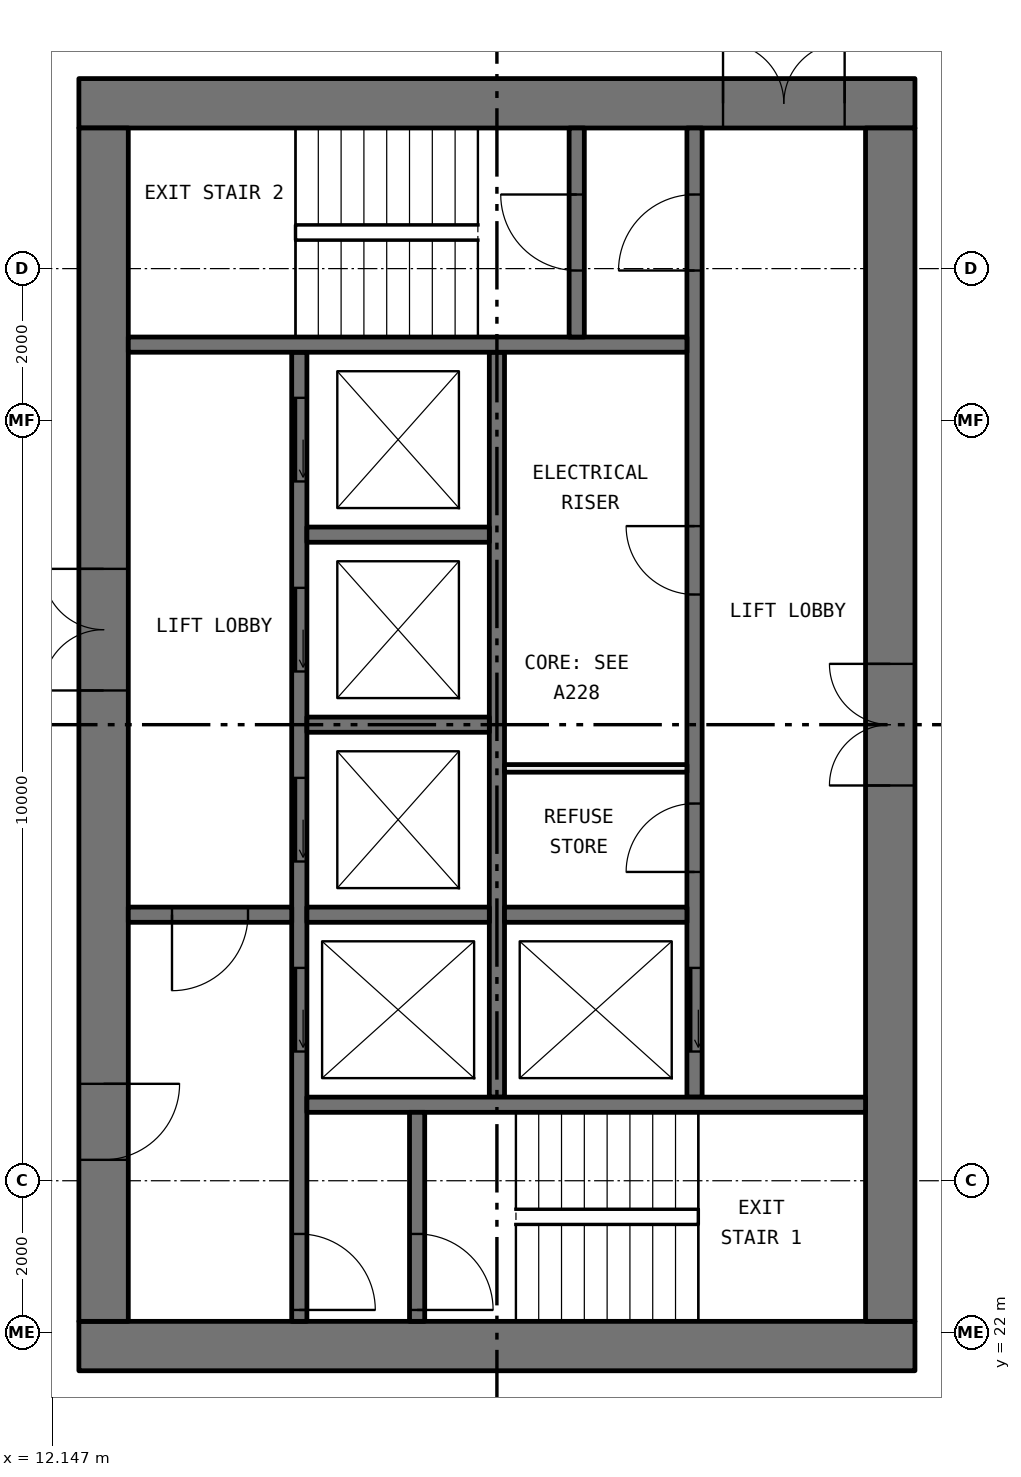
"""IFC4 building model, lengths in metres.
Left out: names, types, materials, properties, quantities, classifications, styles, units other than length and angle.
Written with IfcOpenShell. Run it as: python <this file> out.ifc"""

import sys

from ifc_helpers import new_model, si_unit, direction, frame, frame_2d, origin, place, context, subcontext, project, spatial, rectangle, extrude, element, fill, save


model = new_model("IFC4")
c1 = context("Model", 3, precision=1e-05, world=origin(), true_north=direction((0.0, 1.0)))
c2 = subcontext(c1, "Body", "Model", "MODEL_VIEW")
j1 = project(units=[si_unit("LENGTHUNIT", "METRE"), si_unit("PLANEANGLEUNIT", "RADIAN")], contexts=[c1])
p1 = place(None, origin())
s1 = spatial("IfcSite", under=j1, at=p1, CompositionType="ELEMENT")
p2 = place(p1, origin())
s2 = spatial("IfcBuilding", under=s1, at=p2, CompositionType="ELEMENT")
p3 = place(p2, frame((0.0, 0.0, 106.95)))
s3 = spatial("IfcBuildingStorey", under=s2, at=p3, CompositionType="ELEMENT", Elevation=106.95)
p4 = place(p3, frame((12.5, 21.825, 0.0), z_axis=(0.0, 0.0, 1.0), x_axis=(1.0, 0.0, 0.0)))
e1 = element("IfcWall", 1, at=p4, inside=s3, PredefinedType="SHEAR", context=c2, shape_type="SweptSolid", body=[
    extrude(rectangle(XDim=11.0, YDim=0.65, at=frame_2d((5.5, 0.0))), origin(), (0.0, 0.0, 1.0), 3.05),
])
p5 = place(p3, frame((12.5, 38.175, 0.0), z_axis=(0.0, 0.0, 1.0), x_axis=(1.0, 0.0, 0.0)))
e2 = element("IfcWall", 2, at=p5, inside=s3, PredefinedType="SHEAR", context=c2, shape_type="SweptSolid", body=[
    extrude(rectangle(XDim=11.0, YDim=0.65, at=frame_2d((5.5, 0.0))), origin(), (0.0, 0.0, 1.0), 3.05),
])
p6 = place(p5, frame((8.475, 0.0, 0.0)))
e3 = element("IfcOpeningElement", 3, at=p6, cuts=e2, PredefinedType="OPENING", context=c2, shape_type="SweptSolid", body=[
    extrude(rectangle(XDim=1.6, YDim=2.1, at=frame_2d((0.8, 1.05))), frame((0.0, 0.335, 0.0), z_axis=(0.0, -1.0, 0.0), x_axis=(1.0, 0.0, 0.0)), (0.0, 0.0, 1.0), 0.67),
])
p7 = place(p3, frame((12.825, 22.15, 0.0), z_axis=(0.0, 0.0, 1.0), x_axis=(0.0, 1.0, 0.0)))
e4 = element("IfcWall", 4, at=p7, inside=s3, PredefinedType="SHEAR", context=c2, shape_type="SweptSolid", body=[
    extrude(rectangle(XDim=15.7, YDim=0.65, at=frame_2d((7.85, 0.0))), origin(), (0.0, 0.0, 1.0), 3.05),
])
p8 = place(p7, frame((8.3, 0.0, 0.0)))
e5 = element("IfcOpeningElement", 5, at=p8, cuts=e4, PredefinedType="OPENING", context=c2, shape_type="SweptSolid", body=[
    extrude(rectangle(XDim=1.6, YDim=2.1, at=frame_2d((0.8, 1.05))), frame((0.0, 0.335, 0.0), z_axis=(0.0, -1.0, 0.0), x_axis=(1.0, 0.0, 0.0)), (0.0, 0.0, 1.0), 0.67),
])
p9 = place(p7, frame((2.125, 0.0, 0.0)))
e6 = element("IfcOpeningElement", 6, at=p9, cuts=e4, PredefinedType="OPENING", context=c2, shape_type="SweptSolid", body=[
    extrude(rectangle(XDim=1.0, YDim=2.1, at=frame_2d((0.5, 1.05))), frame((0.0, 0.335, 0.0), z_axis=(0.0, -1.0, 0.0), x_axis=(1.0, 0.0, 0.0)), (0.0, 0.0, 1.0), 0.67),
])
p10 = place(p3, frame((23.175, 22.15, 0.0), z_axis=(0.0, 0.0, 1.0), x_axis=(0.0, 1.0, 0.0)))
e7 = element("IfcWall", 7, at=p10, inside=s3, PredefinedType="SHEAR", context=c2, shape_type="SweptSolid", body=[
    extrude(rectangle(XDim=15.7, YDim=0.65, at=frame_2d((7.85, 0.0))), origin(), (0.0, 0.0, 1.0), 3.05),
])
p11 = place(p10, frame((7.05, 0.0, 0.0)))
e8 = element("IfcOpeningElement", 8, at=p11, cuts=e7, PredefinedType="OPENING", context=c2, shape_type="SweptSolid", body=[
    extrude(rectangle(XDim=1.6, YDim=2.1, at=frame_2d((0.8, 1.05))), frame((0.0, 0.335, 0.0), z_axis=(0.0, -1.0, 0.0), x_axis=(1.0, 0.0, 0.0)), (0.0, 0.0, 1.0), 0.67),
])
p12 = place(p3, frame((15.4, 22.15, 0.0), z_axis=(0.0, 0.0, 1.0), x_axis=(0.0, 1.0, 0.0)))
e9 = element("IfcWall", 9, at=p12, inside=s3, PredefinedType="SOLIDWALL", context=c2, shape_type="SweptSolid", body=[
    extrude(rectangle(XDim=12.75, YDim=0.2, at=frame_2d((6.375, 0.0))), origin(), (0.0, 0.0, 1.0), 3.05),
])
p13 = place(p12, frame((3.55, 0.0, 0.0)))
e10 = element("IfcOpeningElement", 10, at=p13, cuts=e9, PredefinedType="OPENING", context=c2, shape_type="SweptSolid", body=[
    extrude(rectangle(XDim=1.1, YDim=2.1, at=frame_2d((0.55, 1.05))), frame((0.0, 0.11, 0.0), z_axis=(0.0, -1.0, 0.0), x_axis=(1.0, 0.0, 0.0)), (0.0, 0.0, 1.0), 0.22),
])
p14 = place(p12, frame((6.05, 0.0, 0.0)))
e11 = element("IfcOpeningElement", 11, at=p14, cuts=e9, PredefinedType="OPENING", context=c2, shape_type="SweptSolid", body=[
    extrude(rectangle(XDim=1.1, YDim=2.1, at=frame_2d((0.55, 1.05))), frame((0.0, 0.11, 0.0), z_axis=(0.0, -1.0, 0.0), x_axis=(1.0, 0.0, 0.0)), (0.0, 0.0, 1.0), 0.22),
])
p15 = place(p12, frame((8.55, 0.0, 0.0)))
e12 = element("IfcOpeningElement", 12, at=p15, cuts=e9, PredefinedType="OPENING", context=c2, shape_type="SweptSolid", body=[
    extrude(rectangle(XDim=1.1, YDim=2.1, at=frame_2d((0.55, 1.05))), frame((0.0, 0.11, 0.0), z_axis=(0.0, -1.0, 0.0), x_axis=(1.0, 0.0, 0.0)), (0.0, 0.0, 1.0), 0.22),
])
p16 = place(p12, frame((11.05, 0.0, 0.0)))
e13 = element("IfcOpeningElement", 13, at=p16, cuts=e9, PredefinedType="OPENING", context=c2, shape_type="SweptSolid", body=[
    extrude(rectangle(XDim=1.1, YDim=2.1, at=frame_2d((0.55, 1.05))), frame((0.0, 0.11, 0.0), z_axis=(0.0, -1.0, 0.0), x_axis=(1.0, 0.0, 0.0)), (0.0, 0.0, 1.0), 0.22),
])
p17 = place(p12, frame((0.15, 0.0, 0.0)))
e14 = element("IfcOpeningElement", 14, at=p17, cuts=e9, PredefinedType="OPENING", context=c2, shape_type="SweptSolid", body=[
    extrude(rectangle(XDim=1.0, YDim=2.1, at=frame_2d((0.5, 1.05))), frame((0.0, 0.11, 0.0), z_axis=(0.0, -1.0, 0.0), x_axis=(1.0, 0.0, 0.0)), (0.0, 0.0, 1.0), 0.22),
])
p18 = place(p3, frame((20.6, 25.1, 0.0), z_axis=(0.0, 0.0, 1.0), x_axis=(0.0, 1.0, 0.0)))
e15 = element("IfcWall", 15, at=p18, inside=s3, PredefinedType="SOLIDWALL", context=c2, shape_type="SweptSolid", body=[
    extrude(rectangle(XDim=12.75, YDim=0.2, at=frame_2d((6.375, 0.0))), origin(), (0.0, 0.0, 1.0), 3.05),
])
p19 = place(p18, frame((0.6, 0.0, 0.0)))
e16 = element("IfcOpeningElement", 16, at=p19, cuts=e15, PredefinedType="OPENING", context=c2, shape_type="SweptSolid", body=[
    extrude(rectangle(XDim=1.1, YDim=2.1, at=frame_2d((0.55, 1.05))), frame((0.0, 0.11, 0.0), z_axis=(0.0, -1.0, 0.0), x_axis=(1.0, 0.0, 0.0)), (0.0, 0.0, 1.0), 0.22),
])
p20 = place(p18, frame((10.875, 0.0, 0.0)))
e17 = element("IfcOpeningElement", 17, at=p20, cuts=e15, PredefinedType="OPENING", context=c2, shape_type="SweptSolid", body=[
    extrude(rectangle(XDim=1.0, YDim=2.1, at=frame_2d((0.5, 1.05))), frame((0.0, 0.11, 0.0), z_axis=(0.0, -1.0, 0.0), x_axis=(1.0, 0.0, 0.0)), (0.0, 0.0, 1.0), 0.22),
])
p21 = place(p18, frame((2.962, 0.0, 0.0)))
e18 = element("IfcOpeningElement", 18, at=p21, cuts=e15, PredefinedType="OPENING", context=c2, shape_type="SweptSolid", body=[
    extrude(rectangle(XDim=0.9, YDim=2.1, at=frame_2d((0.45, 1.05))), frame((0.0, 0.11, 0.0), z_axis=(0.0, -1.0, 0.0), x_axis=(1.0, 0.0, 0.0)), (0.0, 0.0, 1.0), 0.22),
])
p22 = place(p18, frame((6.613, 0.0, 0.0)))
e19 = element("IfcOpeningElement", 19, at=p22, cuts=e15, PredefinedType="OPENING", context=c2, shape_type="SweptSolid", body=[
    extrude(rectangle(XDim=0.9, YDim=2.1, at=frame_2d((0.45, 1.05))), frame((0.0, 0.11, 0.0), z_axis=(0.0, -1.0, 0.0), x_axis=(1.0, 0.0, 0.0)), (0.0, 0.0, 1.0), 0.22),
])
p23 = place(p3, frame((18.0, 25.1, 0.0), z_axis=(0.0, 0.0, 1.0), x_axis=(0.0, 1.0, 0.0)))
e20 = element("IfcWall", 20, at=p23, inside=s3, PredefinedType="SOLIDWALL", context=c2, shape_type="SweptSolid", body=[
    extrude(rectangle(XDim=9.8, YDim=0.2, at=frame_2d((4.9, 0.0))), origin(), (0.0, 0.0, 1.0), 3.05),
])
for number, where, z_axis, x_axis in (
    (21, (15.5, 25.0, 0.0), (0.0, 0.0, 1.0), (1.0, 0.0, 0.0)),
    (22, (13.15, 35.0, 0.0), (0.0, 0.0, 1.0), (1.0, 0.0, 0.0)),
):
    element("IfcWall", number, at=place(p3, frame(where, z_axis=z_axis, x_axis=x_axis)), inside=s3, PredefinedType="SOLIDWALL", context=c2, shape_type="SweptSolid", body=[
        extrude(rectangle(XDim=7.35, YDim=0.2, at=frame_2d((3.675, 0.0))), origin(), (0.0, 0.0, 1.0), 3.05),
    ])
p24 = place(p3, frame((13.15, 27.5, 0.0), z_axis=(0.0, 0.0, 1.0), x_axis=(1.0, 0.0, 0.0)))
e23 = element("IfcWall", 23, at=p24, inside=s3, PredefinedType="SOLIDWALL", context=c2, shape_type="SweptSolid", body=[
    extrude(rectangle(XDim=2.15, YDim=0.2, at=frame_2d((1.075, 0.0))), origin(), (0.0, 0.0, 1.0), 3.05),
])
p25 = place(p24, frame((0.575, 0.0, 0.0)))
e24 = element("IfcOpeningElement", 24, at=p25, cuts=e23, PredefinedType="OPENING", context=c2, shape_type="SweptSolid", body=[
    extrude(rectangle(XDim=1.0, YDim=2.1, at=frame_2d((0.5, 1.05))), frame((0.0, 0.11, 0.0), z_axis=(0.0, -1.0, 0.0), x_axis=(1.0, 0.0, 0.0)), (0.0, 0.0, 1.0), 0.22),
])
p26 = place(p3, frame((16.95, 22.15, 0.0), z_axis=(0.0, 0.0, 1.0), x_axis=(0.0, 1.0, 0.0)))
e25 = element("IfcWall", 25, at=p26, inside=s3, PredefinedType="SOLIDWALL", context=c2, shape_type="SweptSolid", body=[
    extrude(rectangle(XDim=2.75, YDim=0.2, at=frame_2d((1.375, 0.0))), origin(), (0.0, 0.0, 1.0), 3.05),
])
p27 = place(p26, frame((0.15, 0.0, 0.0)))
e26 = element("IfcOpeningElement", 26, at=p27, cuts=e25, PredefinedType="OPENING", context=c2, shape_type="SweptSolid", body=[
    extrude(rectangle(XDim=1.0, YDim=2.1, at=frame_2d((0.5, 1.05))), frame((0.0, 0.11, 0.0), z_axis=(0.0, -1.0, 0.0), x_axis=(1.0, 0.0, 0.0)), (0.0, 0.0, 1.0), 0.22),
])
p28 = place(p3, frame((19.05, 35.1, 0.0), z_axis=(0.0, 0.0, 1.0), x_axis=(0.0, 1.0, 0.0)))
e27 = element("IfcWall", 27, at=p28, inside=s3, PredefinedType="SOLIDWALL", context=c2, shape_type="SweptSolid", body=[
    extrude(rectangle(XDim=2.75, YDim=0.2, at=frame_2d((1.375, 0.0))), origin(), (0.0, 0.0, 1.0), 3.05),
])
p29 = place(p28, frame((0.875, 0.0, 0.0)))
e28 = element("IfcOpeningElement", 28, at=p29, cuts=e27, PredefinedType="OPENING", context=c2, shape_type="SweptSolid", body=[
    extrude(rectangle(XDim=1.0, YDim=2.1, at=frame_2d((0.5, 1.05))), frame((0.0, 0.11, 0.0), z_axis=(0.0, -1.0, 0.0), x_axis=(1.0, 0.0, 0.0)), (0.0, 0.0, 1.0), 0.22),
])
for number, where, z_axis, x_axis in (
    (29, (15.5, 27.5, 0.0), (0.0, 0.0, 1.0), (1.0, 0.0, 0.0)),
    (30, (15.5, 30.0, 0.0), (0.0, 0.0, 1.0), (1.0, 0.0, 0.0)),
    (31, (15.5, 32.5, 0.0), (0.0, 0.0, 1.0), (1.0, 0.0, 0.0)),
    (32, (18.1, 27.5, 0.0), (0.0, 0.0, 1.0), (1.0, 0.0, 0.0)),
):
    element("IfcWall", number, at=place(p3, frame(where, z_axis=z_axis, x_axis=x_axis)), inside=s3, PredefinedType="SOLIDWALL", context=c2, shape_type="SweptSolid", body=[
        extrude(rectangle(XDim=2.4, YDim=0.2, at=frame_2d((1.2, 0.0))), origin(), (0.0, 0.0, 1.0), 3.05),
    ])
p30 = place(p3, frame((18.1, 29.425, 0.0), z_axis=(0.0, 0.0, 1.0), x_axis=(1.0, 0.0, 0.0)))
e33 = element("IfcWall", 33, at=p30, inside=s3, PredefinedType="PARTITIONING", context=c2, shape_type="SweptSolid", body=[
    extrude(rectangle(XDim=2.4, YDim=0.1, at=frame_2d((1.2, 0.0))), origin(), (0.0, 0.0, 1.0), 3.05),
])
p31 = place(p19, origin())
e34 = element("IfcDoor", 34, at=p31, inside=s3, OperationType="SLIDING_TO_LEFT", PredefinedType="DOOR", context=c2, shape_type="SweptSolid", body=[
    extrude(rectangle(XDim=1.1, YDim=2.1, at=frame_2d((0.55, 1.05))), frame((0.0, 0.025, 0.0), z_axis=(0.0, -1.0, 0.0), x_axis=(1.0, 0.0, 0.0)), (0.0, 0.0, 1.0), 0.05),
])
fill(e16, e34)
p32 = place(p13, origin())
e35 = element("IfcDoor", 35, at=p32, inside=s3, OperationType="SLIDING_TO_LEFT", PredefinedType="DOOR", context=c2, shape_type="SweptSolid", body=[
    extrude(rectangle(XDim=1.1, YDim=2.1, at=frame_2d((0.55, 1.05))), frame((0.0, 0.025, 0.0), z_axis=(0.0, -1.0, 0.0), x_axis=(1.0, 0.0, 0.0)), (0.0, 0.0, 1.0), 0.05),
])
fill(e10, e35)
p33 = place(p14, origin())
e36 = element("IfcDoor", 36, at=p33, inside=s3, OperationType="SLIDING_TO_LEFT", PredefinedType="DOOR", context=c2, shape_type="SweptSolid", body=[
    extrude(rectangle(XDim=1.1, YDim=2.1, at=frame_2d((0.55, 1.05))), frame((0.0, 0.025, 0.0), z_axis=(0.0, -1.0, 0.0), x_axis=(1.0, 0.0, 0.0)), (0.0, 0.0, 1.0), 0.05),
])
fill(e11, e36)
p34 = place(p15, origin())
e37 = element("IfcDoor", 37, at=p34, inside=s3, OperationType="SLIDING_TO_LEFT", PredefinedType="DOOR", context=c2, shape_type="SweptSolid", body=[
    extrude(rectangle(XDim=1.1, YDim=2.1, at=frame_2d((0.55, 1.05))), frame((0.0, 0.025, 0.0), z_axis=(0.0, -1.0, 0.0), x_axis=(1.0, 0.0, 0.0)), (0.0, 0.0, 1.0), 0.05),
])
fill(e12, e37)
p35 = place(p16, origin())
e38 = element("IfcDoor", 38, at=p35, inside=s3, OperationType="SLIDING_TO_LEFT", PredefinedType="DOOR", context=c2, shape_type="SweptSolid", body=[
    extrude(rectangle(XDim=1.1, YDim=2.1, at=frame_2d((0.55, 1.05))), frame((0.0, 0.025, 0.0), z_axis=(0.0, -1.0, 0.0), x_axis=(1.0, 0.0, 0.0)), (0.0, 0.0, 1.0), 0.05),
])
fill(e13, e38)
p36 = place(p27, frame((1.0, 0.0, 0.0), x_axis=(-1.0, 0.0, 0.0)))
e39 = element("IfcDoor", 39, at=p36, inside=s3, OperationType="SINGLE_SWING_LEFT", PredefinedType="DOOR", context=c2, shape_type="SweptSolid", body=[
    extrude(rectangle(XDim=1.0, YDim=2.1, at=frame_2d((0.5, 1.05))), frame((0.0, 0.025, 0.0), z_axis=(0.0, -1.0, 0.0), x_axis=(1.0, 0.0, 0.0)), (0.0, 0.0, 1.0), 0.05),
])
fill(e26, e39)
p37 = place(p17, frame((1.0, 0.0, 0.0), x_axis=(-1.0, 0.0, 0.0)))
e40 = element("IfcDoor", 40, at=p37, inside=s3, OperationType="SINGLE_SWING_LEFT", PredefinedType="DOOR", context=c2, shape_type="SweptSolid", body=[
    extrude(rectangle(XDim=1.0, YDim=2.1, at=frame_2d((0.5, 1.05))), frame((0.0, 0.025, 0.0), z_axis=(0.0, -1.0, 0.0), x_axis=(1.0, 0.0, 0.0)), (0.0, 0.0, 1.0), 0.05),
])
fill(e14, e40)
p38 = place(p20, origin())
e41 = element("IfcDoor", 41, at=p38, inside=s3, OperationType="SINGLE_SWING_RIGHT", PredefinedType="DOOR", context=c2, shape_type="SweptSolid", body=[
    extrude(rectangle(XDim=1.0, YDim=2.1, at=frame_2d((0.5, 1.05))), frame((0.0, 0.025, 0.0), z_axis=(0.0, -1.0, 0.0), x_axis=(1.0, 0.0, 0.0)), (0.0, 0.0, 1.0), 0.05),
])
fill(e17, e41)
p39 = place(p29, origin())
e42 = element("IfcDoor", 42, at=p39, inside=s3, OperationType="SINGLE_SWING_LEFT", PredefinedType="DOOR", context=c2, shape_type="SweptSolid", body=[
    extrude(rectangle(XDim=1.0, YDim=2.1, at=frame_2d((0.5, 1.05))), frame((0.0, 0.025, 0.0), z_axis=(0.0, -1.0, 0.0), x_axis=(1.0, 0.0, 0.0)), (0.0, 0.0, 1.0), 0.05),
])
fill(e28, e42)
p40 = place(p25, frame((1.0, 0.0, 0.0), x_axis=(-1.0, 0.0, 0.0)))
e43 = element("IfcDoor", 43, at=p40, inside=s3, OperationType="SINGLE_SWING_LEFT", PredefinedType="DOOR", context=c2, shape_type="SweptSolid", body=[
    extrude(rectangle(XDim=1.0, YDim=2.1, at=frame_2d((0.5, 1.05))), frame((0.0, 0.025, 0.0), z_axis=(0.0, -1.0, 0.0), x_axis=(1.0, 0.0, 0.0)), (0.0, 0.0, 1.0), 0.05),
])
fill(e24, e43)
p41 = place(p8, origin())
e44 = element("IfcDoor", 44, at=p41, inside=s3, OperationType="DOUBLE_DOOR_SINGLE_SWING", PredefinedType="DOOR", context=c2, shape_type="SweptSolid", body=[
    extrude(rectangle(XDim=1.6, YDim=2.1, at=frame_2d((0.8, 1.05))), frame((0.0, 0.025, 0.0), z_axis=(0.0, -1.0, 0.0), x_axis=(1.0, 0.0, 0.0)), (0.0, 0.0, 1.0), 0.05),
])
fill(e5, e44)
p42 = place(p9, frame((1.0, 0.0, 0.0), x_axis=(-1.0, 0.0, 0.0)))
e45 = element("IfcDoor", 45, at=p42, inside=s3, OperationType="SINGLE_SWING_RIGHT", PredefinedType="DOOR", context=c2, shape_type="SweptSolid", body=[
    extrude(rectangle(XDim=1.0, YDim=2.1, at=frame_2d((0.5, 1.05))), frame((0.0, 0.025, 0.0), z_axis=(0.0, -1.0, 0.0), x_axis=(1.0, 0.0, 0.0)), (0.0, 0.0, 1.0), 0.05),
])
fill(e6, e45)
p43 = place(p6, origin())
e46 = element("IfcDoor", 46, at=p43, inside=s3, OperationType="DOUBLE_DOOR_SINGLE_SWING", PredefinedType="DOOR", context=c2, shape_type="SweptSolid", body=[
    extrude(rectangle(XDim=1.6, YDim=2.1, at=frame_2d((0.8, 1.05))), frame((0.0, 0.025, 0.0), z_axis=(0.0, -1.0, 0.0), x_axis=(1.0, 0.0, 0.0)), (0.0, 0.0, 1.0), 0.05),
])
fill(e3, e46)
p44 = place(p11, origin())
e47 = element("IfcDoor", 47, at=p44, inside=s3, OperationType="DOUBLE_DOOR_SINGLE_SWING", PredefinedType="DOOR", context=c2, shape_type="SweptSolid", body=[
    extrude(rectangle(XDim=1.6, YDim=2.1, at=frame_2d((0.8, 1.05))), frame((0.0, 0.025, 0.0), z_axis=(0.0, -1.0, 0.0), x_axis=(1.0, 0.0, 0.0)), (0.0, 0.0, 1.0), 0.05),
])
fill(e8, e47)
p45 = place(p21, origin())
e48 = element("IfcDoor", 48, at=p45, inside=s3, OperationType="SINGLE_SWING_RIGHT", PredefinedType="DOOR", context=c2, shape_type="SweptSolid", body=[
    extrude(rectangle(XDim=0.9, YDim=2.1, at=frame_2d((0.45, 1.05))), frame((0.0, 0.025, 0.0), z_axis=(0.0, -1.0, 0.0), x_axis=(1.0, 0.0, 0.0)), (0.0, 0.0, 1.0), 0.05),
])
fill(e18, e48)
p46 = place(p22, origin())
e49 = element("IfcDoor", 49, at=p46, inside=s3, OperationType="SINGLE_SWING_LEFT", PredefinedType="DOOR", context=c2, shape_type="SweptSolid", body=[
    extrude(rectangle(XDim=0.9, YDim=2.1, at=frame_2d((0.45, 1.05))), frame((0.0, 0.025, 0.0), z_axis=(0.0, -1.0, 0.0), x_axis=(1.0, 0.0, 0.0)), (0.0, 0.0, 1.0), 0.05),
])
fill(e19, e49)
save(model, sys.argv[1])
